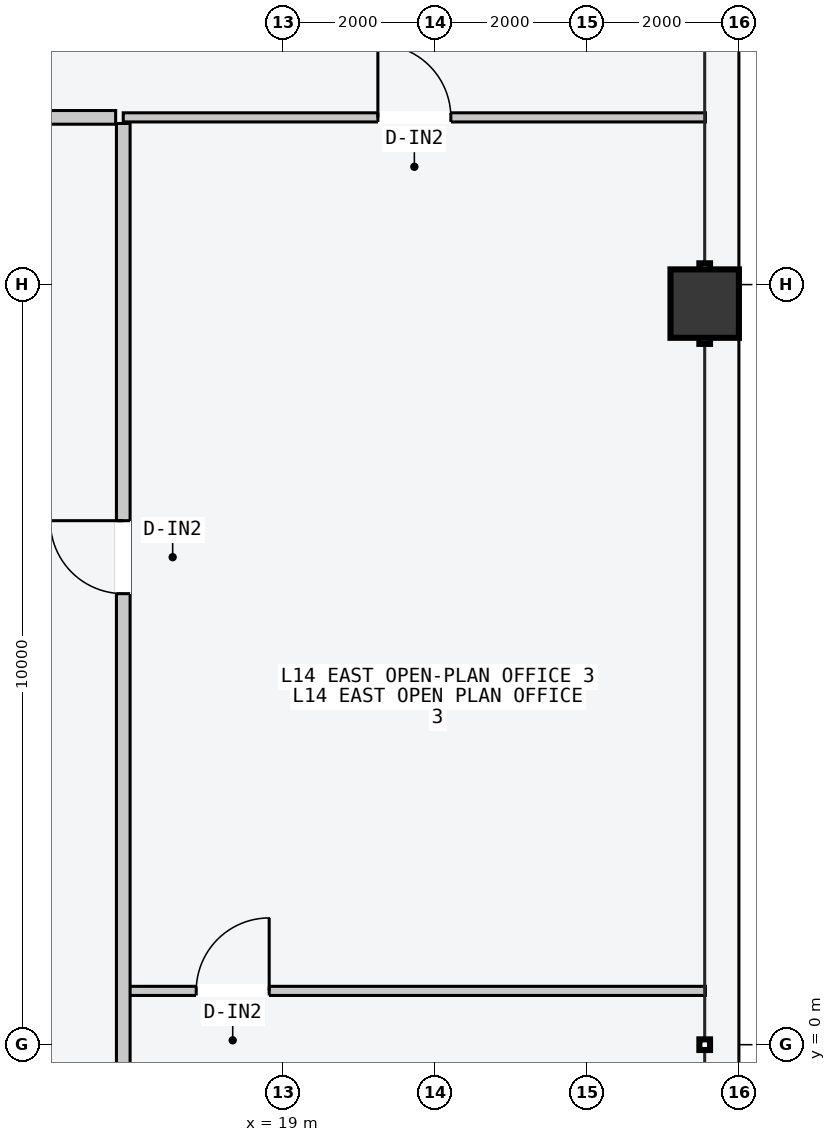
"""IFC4 building model, lengths in metres.
Left out: names, types, materials, properties, quantities, classifications, styles, units other than length and angle.
Written with IfcOpenShell. Run it as: python <this file> out.ifc"""

import sys

from ifc_helpers import new_model, si_unit, direction, frame, frame_2d, origin, origin_2d, place, context, subcontext, project, spatial, rectangle, hollow_rectangle, extrude, element, fill, save


model = new_model("IFC4")
c1 = context("Model", 3, precision=1e-05, world=origin(), true_north=direction((0.0, 1.0)))
c2 = subcontext(c1, "Body", "Model", "MODEL_VIEW")
j1 = project(units=[si_unit("LENGTHUNIT", "METRE"), si_unit("PLANEANGLEUNIT", "RADIAN")], contexts=[c1])
p1 = place(None, origin())
s1 = spatial("IfcSite", under=j1, at=p1, CompositionType="ELEMENT")
p2 = place(p1, origin())
s2 = spatial("IfcBuilding", under=s1, at=p2, CompositionType="ELEMENT")
p3 = place(p2, frame((0.0, 0.0, 56.4)))
s3 = spatial("IfcBuildingStorey", under=s2, at=p3, CompositionType="ELEMENT", Elevation=56.4)
p4 = place(p3, frame((24.55, 9.75, 0.0), z_axis=(0.0, 0.0, 1.0), x_axis=(0.0, 1.0, 0.0)))
e1 = element("IfcColumn", 1, at=p4, inside=s3, PredefinedType="COLUMN", context=c2, shape_type="SweptSolid", body=[
    extrude(hollow_rectangle(XDim=0.9, YDim=0.9, WallThickness=0.045, at=origin_2d()), origin(), (0.0, 0.0, 1.0), 3.6),
])
p5 = place(p3, frame((-16.8, 12.2, 0.0), z_axis=(0.0, 0.0, 1.0), x_axis=(1.0, 0.0, 0.0)))
e2 = element("IfcWall", 2, at=p5, inside=s3, PredefinedType="PARTITIONING", context=c2, shape_type="SweptSolid", body=[
    extrude(rectangle(XDim=33.6, YDim=0.18, at=frame_2d((16.8, 0.0))), origin(), (0.0, 0.0, 1.0), 3.4),
])
p6 = place(p5, frame((16.18, 0.0, 0.0)))
e3 = element("IfcOpeningElement", 3, at=p6, cuts=e2, PredefinedType="OPENING", context=c2, shape_type="SweptSolid", body=[
    extrude(rectangle(XDim=1.24, YDim=2.24, at=frame_2d((0.62, 1.12))), frame((0.0, 0.1, 0.0), z_axis=(0.0, -1.0, 0.0), x_axis=(1.0, 0.0, 0.0)), (0.0, 0.0, 1.0), 0.2),
])
p7 = place(p3, frame((16.9, 12.2, 0.0), z_axis=(0.0, 0.0, 1.0), x_axis=(1.0, 0.0, 0.0)))
e4 = element("IfcWall", 4, at=p7, inside=s3, PredefinedType="PARTITIONING", context=c2, shape_type="SweptSolid", body=[
    extrude(rectangle(XDim=7.66, YDim=0.12, at=frame_2d((3.83, 0.0))), origin(), (0.0, 0.0, 1.0), 3.4),
])
p8 = place(p7, frame((3.35, 0.0, 0.0)))
e5 = element("IfcOpeningElement", 5, at=p8, cuts=e4, PredefinedType="OPENING", context=c2, shape_type="SweptSolid", body=[
    extrude(rectangle(XDim=0.96, YDim=2.18, at=frame_2d((0.48, 1.09))), frame((0.0, 0.07, 0.0), z_axis=(0.0, -1.0, 0.0), x_axis=(1.0, 0.0, 0.0)), (0.0, 0.0, 1.0), 0.14),
])
p9 = place(p3, frame((16.96, 0.708, 0.0), z_axis=(0.0, 0.0, 1.0), x_axis=(1.0, 0.0, 0.0)))
e6 = element("IfcWall", 6, at=p9, inside=s3, PredefinedType="PARTITIONING", context=c2, shape_type="SweptSolid", body=[
    extrude(rectangle(XDim=7.6, YDim=0.12, at=frame_2d((3.8, 0.0))), origin(), (0.0, 0.0, 1.0), 3.4),
])
p10 = place(p9, frame((0.9, 0.0, 0.0)))
e7 = element("IfcOpeningElement", 7, at=p10, cuts=e6, PredefinedType="OPENING", context=c2, shape_type="SweptSolid", body=[
    extrude(rectangle(XDim=0.96, YDim=2.18, at=frame_2d((0.48, 1.09))), frame((0.0, 0.07, 0.0), z_axis=(0.0, -1.0, 0.0), x_axis=(1.0, 0.0, 0.0)), (0.0, 0.0, 1.0), 0.14),
])
p11 = place(p3, frame((16.9, -14.42, 0.0), z_axis=(0.0, 0.0, 1.0), x_axis=(0.0, 1.0, 0.0)))
e8 = element("IfcWall", 8, at=p11, inside=s3, PredefinedType="PARTITIONING", context=c2, shape_type="SweptSolid", body=[
    extrude(rectangle(XDim=26.54, YDim=0.18, at=frame_2d((13.27, 0.0))), origin(), (0.0, 0.0, 1.0), 3.4),
])
p12 = place(p11, frame((2.352, 0.0, 0.0)))
e9 = element("IfcOpeningElement", 9, at=p12, cuts=e8, PredefinedType="OPENING", context=c2, shape_type="SweptSolid", body=[
    extrude(rectangle(XDim=1.4, YDim=2.2, at=frame_2d((0.7, 1.1))), frame((0.0, 0.1, 0.0), z_axis=(0.0, -1.0, 0.0), x_axis=(1.0, 0.0, 0.0)), (0.0, 0.0, 1.0), 0.2),
])
p13 = place(p11, frame((10.166, 0.0, 0.0)))
e10 = element("IfcOpeningElement", 10, at=p13, cuts=e8, PredefinedType="OPENING", context=c2, shape_type="SweptSolid", body=[
    extrude(rectangle(XDim=0.9, YDim=2.15, at=frame_2d((0.45, 1.075))), frame((0.0, 0.1, 0.0), z_axis=(0.0, -1.0, 0.0), x_axis=(1.0, 0.0, 0.0)), (0.0, 0.0, 1.0), 0.2),
])
p14 = place(p11, frame((20.354, 0.0, 0.0)))
e11 = element("IfcOpeningElement", 11, at=p14, cuts=e8, PredefinedType="OPENING", context=c2, shape_type="SweptSolid", body=[
    extrude(rectangle(XDim=0.96, YDim=2.18, at=frame_2d((0.48, 1.09))), frame((0.0, 0.1, 0.0), z_axis=(0.0, -1.0, 0.0), x_axis=(1.0, 0.0, 0.0)), (0.0, 0.0, 1.0), 0.2),
])
p15 = place(p8, origin())
e12 = element("IfcDoor", 12, at=p15, inside=s3, OperationType="SINGLE_SWING_LEFT", PredefinedType="DOOR", context=c2, shape_type="SweptSolid", body=[
    extrude(rectangle(XDim=0.96, YDim=2.18, at=frame_2d((0.48, 1.09))), frame((0.0, 0.025, 0.0), z_axis=(0.0, -1.0, 0.0), x_axis=(1.0, 0.0, 0.0)), (0.0, 0.0, 1.0), 0.05),
])
fill(e5, e12)
p16 = place(p10, origin())
e13 = element("IfcDoor", 13, at=p16, inside=s3, OperationType="SINGLE_SWING_RIGHT", PredefinedType="DOOR", context=c2, shape_type="SweptSolid", body=[
    extrude(rectangle(XDim=0.96, YDim=2.18, at=frame_2d((0.48, 1.09))), frame((0.0, 0.025, 0.0), z_axis=(0.0, -1.0, 0.0), x_axis=(1.0, 0.0, 0.0)), (0.0, 0.0, 1.0), 0.05),
])
fill(e7, e13)
p17 = place(p14, origin())
e14 = element("IfcDoor", 14, at=p17, inside=s3, OperationType="SINGLE_SWING_RIGHT", PredefinedType="DOOR", context=c2, shape_type="SweptSolid", body=[
    extrude(rectangle(XDim=0.96, YDim=2.18, at=frame_2d((0.48, 1.09))), frame((0.0, 0.025, 0.0), z_axis=(0.0, -1.0, 0.0), x_axis=(1.0, 0.0, 0.0)), (0.0, 0.0, 1.0), 0.05),
])
fill(e11, e14)
save(model, sys.argv[1])
